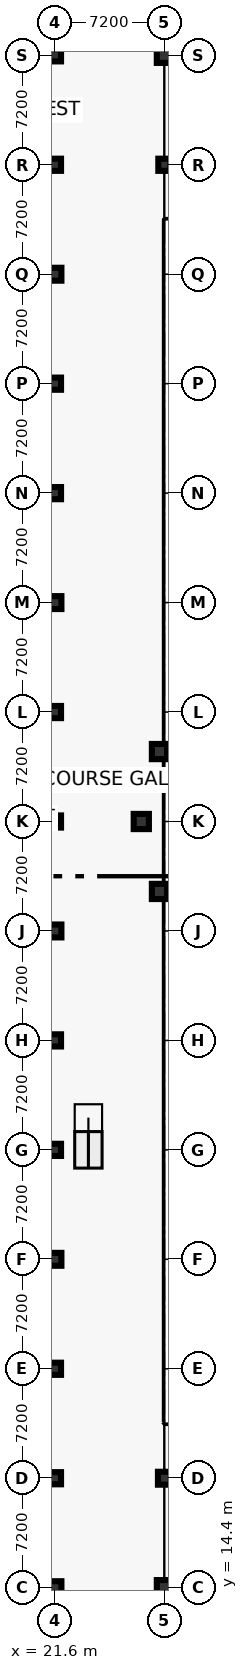
"""IFC4 building model, lengths in metres.
Left out: names, types, materials, properties, quantities, classifications, styles, units other than length and angle.
Written with IfcOpenShell. Run it as: python <this file> out.ifc"""

import sys

from ifc_helpers import new_model, si_unit, direction, frame, origin, origin_2d, place, context, subcontext, project, spatial, rectangle, circle, extrude, element, save


model = new_model("IFC4")
c1 = context("Model", 3, precision=1e-05, world=origin(), true_north=direction((0.0, 1.0)))
c2 = subcontext(c1, "Body", "Model", "MODEL_VIEW")
j1 = project(units=[si_unit("LENGTHUNIT", "METRE"), si_unit("PLANEANGLEUNIT", "RADIAN")], contexts=[c1])
p1 = place(None, origin())
s1 = spatial("IfcSite", under=j1, at=p1, CompositionType="ELEMENT")
p2 = place(p1, origin())
s2 = spatial("IfcBuilding", under=s1, at=p2, CompositionType="ELEMENT")
p3 = place(p2, frame((0.0, 0.0, 5.4)))
s3 = spatial("IfcBuildingStorey", under=s2, at=p3, CompositionType="ELEMENT", Elevation=5.4)
p4 = place(p3, frame((21.6, 14.4, 0.0), z_axis=(0.0, 0.0, 1.0), x_axis=(1.0, 0.0, 0.0)))
e1 = element("IfcColumn", 1, at=p4, inside=s3, PredefinedType="COLUMN", context=c2, shape_type="SweptSolid", body=[
    extrude(rectangle(XDim=0.85, YDim=0.85, at=origin_2d()), origin(), (0.0, 0.0, 1.0), 4.2),
])
p5 = place(p3, frame((21.6, 21.6, 0.0), z_axis=(0.0, 0.0, 1.0), x_axis=(1.0, 0.0, 0.0)))
e2 = element("IfcColumn", 2, at=p5, inside=s3, PredefinedType="COLUMN", context=c2, shape_type="SweptSolid", body=[
    extrude(rectangle(XDim=0.8, YDim=0.8, at=origin_2d()), origin(), (0.0, 0.0, 1.0), 4.2),
])
p6 = place(p3, frame((21.6, 28.8, 0.0), z_axis=(0.0, 0.0, 1.0), x_axis=(1.0, 0.0, 0.0)))
e3 = element("IfcColumn", 3, at=p6, inside=s3, PredefinedType="COLUMN", context=c2, shape_type="SweptSolid", body=[
    extrude(circle(Radius=0.4, at=origin_2d()), origin(), (0.0, 0.0, 1.0), 4.2),
])
p7 = place(p3, frame((21.6, 36.0, 0.0), z_axis=(0.0, 0.0, 1.0), x_axis=(1.0, 0.0, 0.0)))
e4 = element("IfcColumn", 4, at=p7, inside=s3, PredefinedType="COLUMN", context=c2, shape_type="SweptSolid", body=[
    extrude(rectangle(XDim=0.85, YDim=0.85, at=origin_2d()), origin(), (0.0, 0.0, 1.0), 4.2),
])
p8 = place(p3, frame((21.6, 43.2, 0.0), z_axis=(0.0, 0.0, 1.0), x_axis=(1.0, 0.0, 0.0)))
e5 = element("IfcColumn", 5, at=p8, inside=s3, PredefinedType="COLUMN", context=c2, shape_type="SweptSolid", body=[
    extrude(rectangle(XDim=0.8, YDim=0.8, at=origin_2d()), origin(), (0.0, 0.0, 1.0), 4.2),
])
p9 = place(p3, frame((21.6, 50.4, 0.0), z_axis=(0.0, 0.0, 1.0), x_axis=(1.0, 0.0, 0.0)))
e6 = element("IfcColumn", 6, at=p9, inside=s3, PredefinedType="COLUMN", context=c2, shape_type="SweptSolid", body=[
    extrude(circle(Radius=0.4, at=origin_2d()), origin(), (0.0, 0.0, 1.0), 4.2),
])
p10 = place(p3, frame((21.6, 57.6, 0.0), z_axis=(0.0, 0.0, 1.0), x_axis=(1.0, 0.0, 0.0)))
e7 = element("IfcColumn", 7, at=p10, inside=s3, PredefinedType="COLUMN", context=c2, shape_type="SweptSolid", body=[
    extrude(rectangle(XDim=0.85, YDim=0.85, at=origin_2d()), origin(), (0.0, 0.0, 1.0), 4.2),
])
p11 = place(p3, frame((21.6, 64.8, 0.0), z_axis=(0.0, 0.0, 1.0), x_axis=(1.0, 0.0, 0.0)))
e8 = element("IfcColumn", 8, at=p11, inside=s3, PredefinedType="COLUMN", context=c2, shape_type="SweptSolid", body=[
    extrude(rectangle(XDim=0.8, YDim=0.8, at=origin_2d()), origin(), (0.0, 0.0, 1.0), 4.2),
])
p12 = place(p3, frame((21.6, 72.0, 0.0), z_axis=(0.0, 0.0, 1.0), x_axis=(1.0, 0.0, 0.0)))
e9 = element("IfcColumn", 9, at=p12, inside=s3, PredefinedType="COLUMN", context=c2, shape_type="SweptSolid", body=[
    extrude(circle(Radius=0.4, at=origin_2d()), origin(), (0.0, 0.0, 1.0), 4.2),
])
p13 = place(p3, frame((21.6, 79.2, 0.0), z_axis=(0.0, 0.0, 1.0), x_axis=(1.0, 0.0, 0.0)))
e10 = element("IfcColumn", 10, at=p13, inside=s3, PredefinedType="COLUMN", context=c2, shape_type="SweptSolid", body=[
    extrude(rectangle(XDim=0.85, YDim=0.85, at=origin_2d()), origin(), (0.0, 0.0, 1.0), 4.2),
])
p14 = place(p3, frame((21.6, 86.4, 0.0), z_axis=(0.0, 0.0, 1.0), x_axis=(1.0, 0.0, 0.0)))
e11 = element("IfcColumn", 11, at=p14, inside=s3, PredefinedType="COLUMN", context=c2, shape_type="SweptSolid", body=[
    extrude(rectangle(XDim=0.8, YDim=0.8, at=origin_2d()), origin(), (0.0, 0.0, 1.0), 4.2),
])
p15 = place(p3, frame((21.6, 93.6, 0.0), z_axis=(0.0, 0.0, 1.0), x_axis=(1.0, 0.0, 0.0)))
e12 = element("IfcColumn", 12, at=p15, inside=s3, PredefinedType="COLUMN", context=c2, shape_type="SweptSolid", body=[
    extrude(circle(Radius=0.4, at=origin_2d()), origin(), (0.0, 0.0, 1.0), 4.2),
])
p16 = place(p3, frame((21.6, 100.8, 0.0), z_axis=(0.0, 0.0, 1.0), x_axis=(1.0, 0.0, 0.0)))
e13 = element("IfcColumn", 13, at=p16, inside=s3, PredefinedType="COLUMN", context=c2, shape_type="SweptSolid", body=[
    extrude(rectangle(XDim=0.85, YDim=0.85, at=origin_2d()), origin(), (0.0, 0.0, 1.0), 4.2),
])
p17 = place(p3, frame((21.6, 108.0, 0.0), z_axis=(0.0, 0.0, 1.0), x_axis=(1.0, 0.0, 0.0)))
e14 = element("IfcColumn", 14, at=p17, inside=s3, PredefinedType="COLUMN", context=c2, shape_type="SweptSolid", body=[
    extrude(rectangle(XDim=0.8, YDim=0.8, at=origin_2d()), origin(), (0.0, 0.0, 1.0), 4.2),
])
p18 = place(p3, frame((21.6, 115.2, 0.0), z_axis=(0.0, 0.0, 1.0), x_axis=(1.0, 0.0, 0.0)))
e15 = element("IfcColumn", 15, at=p18, inside=s3, PredefinedType="COLUMN", context=c2, shape_type="SweptSolid", body=[
    extrude(circle(Radius=0.4, at=origin_2d()), origin(), (0.0, 0.0, 1.0), 4.2),
])
p19 = place(p3, frame((28.8, 14.4, 0.0), z_axis=(0.0, 0.0, 1.0), x_axis=(1.0, 0.0, 0.0)))
e16 = element("IfcColumn", 16, at=p19, inside=s3, PredefinedType="COLUMN", context=c2, shape_type="SweptSolid", body=[
    extrude(circle(Radius=0.5, at=origin_2d()), origin(), (0.0, 0.0, 1.0), 4.2),
])
p20 = place(p3, frame((28.8, 21.6, 0.0), z_axis=(0.0, 0.0, 1.0), x_axis=(1.0, 0.0, 0.0)))
e17 = element("IfcColumn", 17, at=p20, inside=s3, PredefinedType="COLUMN", context=c2, shape_type="SweptSolid", body=[
    extrude(rectangle(XDim=0.85, YDim=0.85, at=origin_2d()), origin(), (0.0, 0.0, 1.0), 4.2),
])
p21 = place(p3, frame((28.8, 108.0, 0.0), z_axis=(0.0, 0.0, 1.0), x_axis=(1.0, 0.0, 0.0)))
e18 = element("IfcColumn", 18, at=p21, inside=s3, PredefinedType="COLUMN", context=c2, shape_type="SweptSolid", body=[
    extrude(rectangle(XDim=0.8, YDim=0.8, at=origin_2d()), origin(), (0.0, 0.0, 1.0), 4.2),
])
for number, where, z_axis, x_axis in (
    (19, (28.8, 115.2, 0.0), (0.0, 0.0, 1.0), (1.0, 0.0, 0.0)),
    (20, (28.475, 69.401, 0.0), (0.0, 0.0, 1.0), (1.0, 0.0, 0.0)),
    (21, (27.28, 64.8, 0.0), (0.0, 0.0, 1.0), (1.0, 0.0, 0.0)),
    (22, (28.475, 60.199, 0.0), (0.0, 0.0, 1.0), (1.0, 0.0, 0.0)),
):
    element("IfcColumn", number, at=place(p3, frame(where, z_axis=z_axis, x_axis=x_axis)), inside=s3, PredefinedType="COLUMN", context=c2, shape_type="SweptSolid", body=[
        extrude(circle(Radius=0.5, at=origin_2d()), origin(), (0.0, 0.0, 1.0), 4.2),
    ])
save(model, sys.argv[1])
